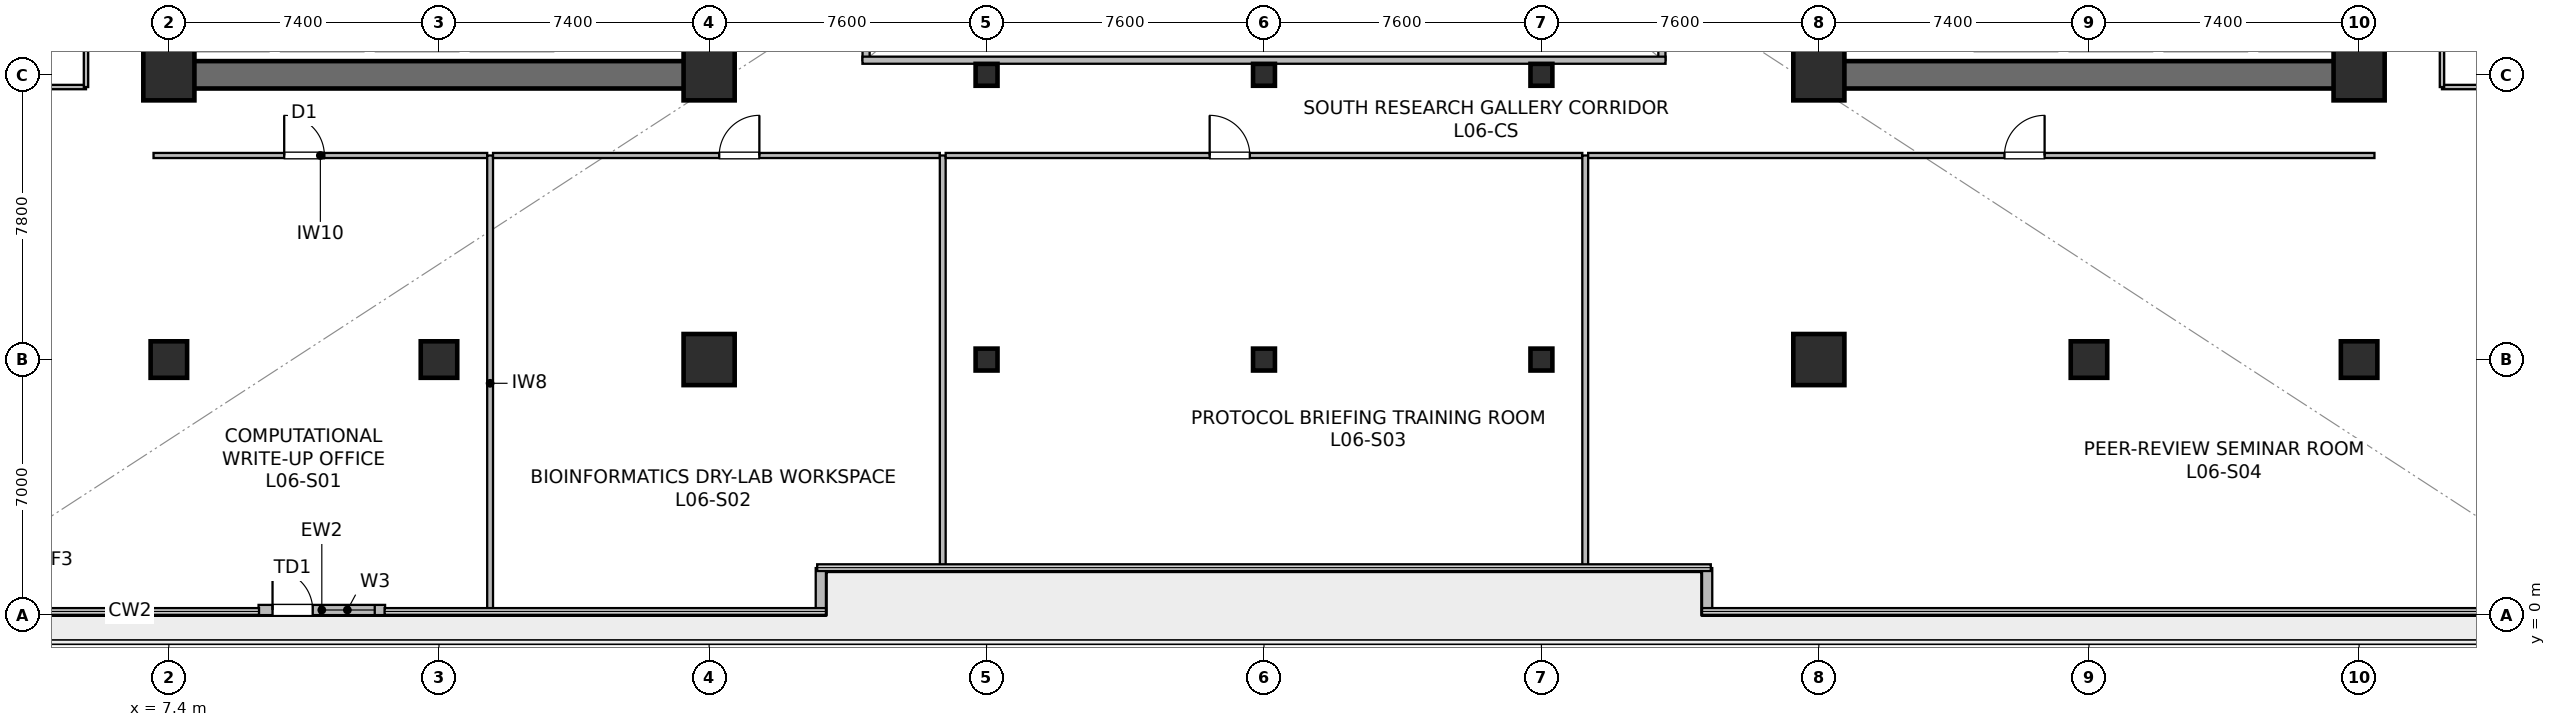
"""IFC4 building model, lengths in metres.
Left out: names, types, materials, properties, quantities, classifications, styles, units other than length and angle.
Written with IfcOpenShell. Run it as: python <this file> out.ifc"""

import sys

from ifc_helpers import new_model, si_unit, direction, frame, frame_2d, origin, origin_2d, place, context, subcontext, project, spatial, rectangle, hollow_rectangle, extrude, source, transform, mapped, element, fill, save


model = new_model("IFC4")
c1 = context("Model", 3, precision=1e-05, world=origin(), true_north=direction((0.0, 1.0)))
c2 = subcontext(c1, "Body", "Model", "MODEL_VIEW")
j1 = project(units=[si_unit("LENGTHUNIT", "METRE"), si_unit("PLANEANGLEUNIT", "RADIAN")], contexts=[c1])
p1 = place(None, origin())
s1 = spatial("IfcSite", under=j1, at=p1, CompositionType="ELEMENT")
p2 = place(p1, origin())
s2 = spatial("IfcBuilding", under=s1, at=p2, CompositionType="ELEMENT")
p3 = place(p2, frame((0.0, 0.0, 25.2)))
s3 = spatial("IfcBuildingStorey", under=s2, at=p3, CompositionType="ELEMENT", Elevation=25.2)
p4 = place(p3, frame((7.025, 14.8, 0.0), z_axis=(0.0, 0.0, 1.0), x_axis=(1.0, 0.0, 0.0)))
e1 = element("IfcWall", 1, at=p4, inside=s3, PredefinedType="SHEAR", context=c2, shape_type="SweptSolid", body=[
    extrude(rectangle(XDim=15.55, YDim=0.75, at=frame_2d((7.775, 0.0))), origin(), (0.0, 0.0, 1.0), 3.78),
])
p5 = place(p3, frame((7.4, 15.175, 0.0), z_axis=(0.0, 0.0, 1.0), x_axis=(0.0, 1.0, 0.0)))
e2 = element("IfcWall", 2, at=p5, inside=s3, PredefinedType="SHEAR", context=c2, shape_type="SweptSolid", body=[
    extrude(rectangle(XDim=18.25, YDim=0.75, at=frame_2d((9.125, 0.0))), origin(), (0.0, 0.0, 1.0), 3.78),
])
p6 = place(p3, frame((22.2, 15.175, 0.0), z_axis=(0.0, 0.0, 1.0), x_axis=(0.0, 1.0, 0.0)))
e3 = element("IfcWall", 3, at=p6, inside=s3, PredefinedType="SHEAR", context=c2, shape_type="SweptSolid", body=[
    extrude(rectangle(XDim=18.25, YDim=0.75, at=frame_2d((9.125, 0.0))), origin(), (0.0, 0.0, 1.0), 3.78),
])
p7 = place(p6, frame((3.375, 0.0, 0.0)))
e4 = element("IfcOpeningElement", 4, at=p7, cuts=e3, PredefinedType="OPENING", context=c2, shape_type="SweptSolid", body=[
    extrude(rectangle(XDim=1.42, YDim=2.2, at=frame_2d((0.71, 1.1))), frame((0.0, 0.385, 0.0), z_axis=(0.0, -1.0, 0.0), x_axis=(1.0, 0.0, 0.0)), (0.0, 0.0, 1.0), 0.77),
])
p8 = place(p3, frame((52.225, 14.8, 0.0), z_axis=(0.0, 0.0, 1.0), x_axis=(1.0, 0.0, 0.0)))
e5 = element("IfcWall", 5, at=p8, inside=s3, PredefinedType="SHEAR", context=c2, shape_type="SweptSolid", body=[
    extrude(rectangle(XDim=15.55, YDim=0.75, at=frame_2d((7.775, 0.0))), origin(), (0.0, 0.0, 1.0), 3.78),
])
p9 = place(p3, frame((52.6, 15.175, 0.0), z_axis=(0.0, 0.0, 1.0), x_axis=(0.0, 1.0, 0.0)))
e6 = element("IfcWall", 6, at=p9, inside=s3, PredefinedType="SHEAR", context=c2, shape_type="SweptSolid", body=[
    extrude(rectangle(XDim=18.25, YDim=0.75, at=frame_2d((9.125, 0.0))), origin(), (0.0, 0.0, 1.0), 3.78),
])
p10 = place(p9, frame((3.375, 0.0, 0.0)))
e7 = element("IfcOpeningElement", 7, at=p10, cuts=e6, PredefinedType="OPENING", context=c2, shape_type="SweptSolid", body=[
    extrude(rectangle(XDim=1.42, YDim=2.2, at=frame_2d((0.71, 1.1))), frame((0.0, 0.385, 0.0), z_axis=(0.0, -1.0, 0.0), x_axis=(1.0, 0.0, 0.0)), (0.0, 0.0, 1.0), 0.77),
])
p11 = place(p3, frame((67.4, 15.175, 0.0), z_axis=(0.0, 0.0, 1.0), x_axis=(0.0, 1.0, 0.0)))
e8 = element("IfcWall", 8, at=p11, inside=s3, PredefinedType="SHEAR", context=c2, shape_type="SweptSolid", body=[
    extrude(rectangle(XDim=18.25, YDim=0.75, at=frame_2d((9.125, 0.0))), origin(), (0.0, 0.0, 1.0), 3.78),
])
m1 = source(origin(), c2, "Body", "SweptSolid", [
    extrude(rectangle(XDim=1.0, YDim=1.0, at=origin_2d()), origin(), (0.0, 0.0, 1.0), 4.1),
])
p12 = place(p3, frame((14.8, 7.0, 0.0), z_axis=(0.0, 0.0, 1.0), x_axis=(1.0, 0.0, 0.0)))
e9 = element("IfcColumn", 9, at=p12, inside=s3, PredefinedType="COLUMN", context=c2, shape_type="MappedRepresentation", body=[
    mapped(m1, transform((0.0, 0.0, 0.0), scale=1.0)),
])
m2 = source(origin(), c2, "Body", "SweptSolid", [
    extrude(rectangle(XDim=1.4, YDim=1.4, at=origin_2d()), origin(), (0.0, 0.0, 1.0), 4.1),
])
for number, where, z_axis, x_axis in (
    (10, (22.2, 7.0, 0.0), (0.0, 0.0, 1.0), (1.0, 0.0, 0.0)),
    (11, (7.4, 14.8, 0.0), (0.0, 0.0, 1.0), (1.0, 0.0, 0.0)),
    (12, (22.2, 14.8, 0.0), (0.0, 0.0, 1.0), (1.0, 0.0, 0.0)),
    (13, (52.6, 7.0, 0.0), (0.0, 0.0, 1.0), (1.0, 0.0, 0.0)),
):
    element("IfcColumn", number, at=place(p3, frame(where, z_axis=z_axis, x_axis=x_axis)), inside=s3, PredefinedType="COLUMN", context=c2, shape_type="MappedRepresentation", body=[
        mapped(m2, transform((0.0, 0.0, 0.0), scale=1.0)),
    ])
p13 = place(p3, frame((60.0, 7.0, 0.0), z_axis=(0.0, 0.0, 1.0), x_axis=(1.0, 0.0, 0.0)))
e14 = element("IfcColumn", 14, at=p13, inside=s3, PredefinedType="COLUMN", context=c2, shape_type="MappedRepresentation", body=[
    mapped(m1, transform((0.0, 0.0, 0.0), scale=1.0)),
])
for number, where, z_axis, x_axis in (
    (15, (52.6, 14.8, 0.0), (0.0, 0.0, 1.0), (1.0, 0.0, 0.0)),
    (16, (67.4, 14.8, 0.0), (0.0, 0.0, 1.0), (1.0, 0.0, 0.0)),
):
    element("IfcColumn", number, at=place(p3, frame(where, z_axis=z_axis, x_axis=x_axis)), inside=s3, PredefinedType="COLUMN", context=c2, shape_type="MappedRepresentation", body=[
        mapped(m2, transform((0.0, 0.0, 0.0), scale=1.0)),
    ])
for number, where, z_axis, x_axis in (
    (17, (7.4, 7.0, 0.0), (0.0, 0.0, 1.0), (1.0, 0.0, 0.0)),
    (18, (67.4, 7.0, 0.0), (0.0, 0.0, 1.0), (1.0, 0.0, 0.0)),
):
    element("IfcColumn", number, at=place(p3, frame(where, z_axis=z_axis, x_axis=x_axis)), inside=s3, PredefinedType="COLUMN", context=c2, shape_type="MappedRepresentation", body=[
        mapped(m1, transform((0.0, 0.0, 0.0), scale=1.0)),
    ])
m3 = source(origin(), c2, "Body", "SweptSolid", [
    extrude(hollow_rectangle(XDim=0.6, YDim=0.6, WallThickness=0.028, at=origin_2d()), origin(), (0.0, 0.0, 1.0), 4.1),
])
for number, where, z_axis, x_axis in (
    (19, (29.8, 7.0, 0.0), (0.0, 0.0, 1.0), (1.0, 0.0, 0.0)),
    (20, (29.8, 14.8, 0.0), (0.0, 0.0, 1.0), (1.0, 0.0, 0.0)),
    (21, (37.4, 7.0, 0.0), (0.0, 0.0, 1.0), (1.0, 0.0, 0.0)),
    (22, (37.4, 14.8, 0.0), (0.0, 0.0, 1.0), (1.0, 0.0, 0.0)),
    (23, (45.0, 7.0, 0.0), (0.0, 0.0, 1.0), (1.0, 0.0, 0.0)),
    (24, (45.0, 14.8, 0.0), (0.0, 0.0, 1.0), (1.0, 0.0, 0.0)),
):
    element("IfcColumn", number, at=place(p3, frame(where, z_axis=z_axis, x_axis=x_axis)), inside=s3, PredefinedType="COLUMN", context=c2, shape_type="MappedRepresentation", body=[
        mapped(m3, transform((0.0, 0.0, 0.0), scale=1.0)),
    ])
p14 = place(p3, frame((9.857, 0.14, 0.0), z_axis=(0.0, 0.0, 1.0), x_axis=(1.0, 0.0, 0.0)))
e25 = element("IfcWall", 25, at=p14, inside=s3, PredefinedType="STANDARD", context=c2, shape_type="SweptSolid", body=[
    extrude(rectangle(XDim=3.466, YDim=0.28, at=frame_2d((1.733, 0.0))), origin(), (0.0, 0.0, 1.0), 3.78),
])
p15 = place(p14, frame((0.383, 0.0, 0.0)))
e26 = element("IfcOpeningElement", 26, at=p15, cuts=e25, PredefinedType="OPENING", context=c2, shape_type="SweptSolid", body=[
    extrude(rectangle(XDim=1.1, YDim=2.2, at=frame_2d((0.55, 1.1))), frame((0.0, 0.15, 0.0), z_axis=(0.0, -1.0, 0.0), x_axis=(1.0, 0.0, 0.0)), (0.0, 0.0, 1.0), 0.3),
])
p16 = place(p14, frame((1.683, 0.0, 0.9)))
e27 = element("IfcOpeningElement", 27, at=p16, cuts=e25, PredefinedType="OPENING", context=c2, shape_type="SweptSolid", body=[
    extrude(rectangle(XDim=1.5, YDim=2.2, at=frame_2d((0.75, 1.1))), frame((0.0, 0.15, 0.0), z_axis=(0.0, -1.0, 0.0), x_axis=(1.0, 0.0, 0.0)), (0.0, 0.0, 1.0), 0.3),
])
for number, where, z_axis, x_axis in (
    (28, (25.26, 0.0, 0.0), (0.0, 0.0, 1.0), (0.0, 1.0, 0.0)),
    (29, (49.54, 1.288, 0.0), (0.0, 0.0, 1.0), (0.0, -1.0, 0.0)),
):
    element("IfcWall", number, at=place(p3, frame(where, z_axis=z_axis, x_axis=x_axis)), inside=s3, PredefinedType="STANDARD", context=c2, shape_type="SweptSolid", body=[
        extrude(rectangle(XDim=1.288, YDim=0.28, at=frame_2d((0.644, 0.0))), origin(), (0.0, 0.0, 1.0), 3.78),
    ])
p17 = place(p3, frame((26.5, 15.2, 0.0), z_axis=(0.0, 0.0, 1.0), x_axis=(0.0, 1.0, 0.0)))
e30 = element("IfcWall", 30, at=p17, inside=s3, PredefinedType="SOLIDWALL", context=c2, shape_type="SweptSolid", body=[
    extrude(rectangle(XDim=18.2, YDim=0.195, at=frame_2d((9.1, 0.0))), origin(), (0.0, 0.0, 1.0), 3.78),
])
p18 = place(p17, frame((1.8, 0.0, 0.9)))
e31 = element("IfcOpeningElement", 31, at=p18, cuts=e30, PredefinedType="OPENING", context=c2, shape_type="SweptSolid", body=[
    extrude(rectangle(XDim=1.5, YDim=1.4, at=frame_2d((0.75, 0.7))), frame((0.0, 0.107, 0.0), z_axis=(0.0, -1.0, 0.0), x_axis=(1.0, 0.0, 0.0)), (0.0, 0.0, 1.0), 0.215),
])
p19 = place(p17, frame((13.2, 0.0, 0.9)))
e32 = element("IfcOpeningElement", 32, at=p19, cuts=e30, PredefinedType="OPENING", context=c2, shape_type="SweptSolid", body=[
    extrude(rectangle(XDim=1.5, YDim=1.4, at=frame_2d((0.75, 0.7))), frame((0.0, 0.107, 0.0), z_axis=(0.0, -1.0, 0.0), x_axis=(1.0, 0.0, 0.0)), (0.0, 0.0, 1.0), 0.215),
])
p20 = place(p3, frame((48.3, 15.2, 0.0), z_axis=(0.0, 0.0, 1.0), x_axis=(0.0, 1.0, 0.0)))
e33 = element("IfcWall", 33, at=p20, inside=s3, PredefinedType="SOLIDWALL", context=c2, shape_type="SweptSolid", body=[
    extrude(rectangle(XDim=18.2, YDim=0.195, at=frame_2d((9.1, 0.0))), origin(), (0.0, 0.0, 1.0), 3.78),
])
p21 = place(p20, frame((1.8, 0.0, 0.9)))
e34 = element("IfcOpeningElement", 34, at=p21, cuts=e33, PredefinedType="OPENING", context=c2, shape_type="SweptSolid", body=[
    extrude(rectangle(XDim=1.5, YDim=1.4, at=frame_2d((0.75, 0.7))), frame((0.0, 0.107, 0.0), z_axis=(0.0, -1.0, 0.0), x_axis=(1.0, 0.0, 0.0)), (0.0, 0.0, 1.0), 0.215),
])
p22 = place(p20, frame((13.2, 0.0, 0.9)))
e35 = element("IfcOpeningElement", 35, at=p22, cuts=e33, PredefinedType="OPENING", context=c2, shape_type="SweptSolid", body=[
    extrude(rectangle(XDim=1.5, YDim=1.4, at=frame_2d((0.75, 0.7))), frame((0.0, 0.107, 0.0), z_axis=(0.0, -1.0, 0.0), x_axis=(1.0, 0.0, 0.0)), (0.0, 0.0, 1.0), 0.215),
])
p23 = place(p3, frame((26.4, 15.2, 0.0), z_axis=(0.0, 0.0, 1.0), x_axis=(1.0, 0.0, 0.0)))
e36 = element("IfcWall", 36, at=p23, inside=s3, PredefinedType="SOLIDWALL", context=c2, shape_type="SweptSolid", body=[
    extrude(rectangle(XDim=22.0, YDim=0.195, at=frame_2d((11.0, 0.0))), origin(), (0.0, 0.0, 1.0), 3.78),
])
p24 = place(p3, frame((6.98, 12.59, 0.0), z_axis=(0.0, 0.0, 1.0), x_axis=(1.0, 0.0, 0.0)))
e37 = element("IfcWall", 37, at=p24, inside=s3, PredefinedType="PARTITIONING", context=c2, shape_type="SweptSolid", body=[
    extrude(rectangle(XDim=9.14, YDim=0.14, at=frame_2d((4.57, 0.0))), origin(), (0.0, 0.0, 1.0), 3.065),
])
p25 = place(p24, frame((3.58, 0.0, 0.0)))
e38 = element("IfcOpeningElement", 38, at=p25, cuts=e37, PredefinedType="OPENING", context=c2, shape_type="SweptSolid", body=[
    extrude(rectangle(XDim=1.1, YDim=2.18, at=frame_2d((0.55, 1.09))), frame((0.0, 0.08, 0.0), z_axis=(0.0, -1.0, 0.0), x_axis=(1.0, 0.0, 0.0)), (0.0, 0.0, 1.0), 0.16),
])
p26 = place(p3, frame((16.2, 0.11, 0.0), z_axis=(0.0, 0.0, 1.0), x_axis=(0.0, 1.0, 0.0)))
e39 = element("IfcWall", 39, at=p26, inside=s3, PredefinedType="PARTITIONING", context=c2, shape_type="SweptSolid", body=[
    extrude(rectangle(XDim=12.48, YDim=0.16, at=frame_2d((6.24, 0.0))), origin(), (0.0, 0.0, 1.0), 3.015),
])
p27 = place(p3, frame((16.28, 12.59, 0.0), z_axis=(0.0, 0.0, 1.0), x_axis=(1.0, 0.0, 0.0)))
e40 = element("IfcWall", 40, at=p27, inside=s3, PredefinedType="PARTITIONING", context=c2, shape_type="SweptSolid", body=[
    extrude(rectangle(XDim=12.24, YDim=0.14, at=frame_2d((6.12, 0.0))), origin(), (0.0, 0.0, 1.0), 3.065),
])
p28 = place(p27, frame((6.196, 0.0, 0.0)))
e41 = element("IfcOpeningElement", 41, at=p28, cuts=e40, PredefinedType="OPENING", context=c2, shape_type="SweptSolid", body=[
    extrude(rectangle(XDim=1.1, YDim=2.18, at=frame_2d((0.55, 1.09))), frame((0.0, 0.08, 0.0), z_axis=(0.0, -1.0, 0.0), x_axis=(1.0, 0.0, 0.0)), (0.0, 0.0, 1.0), 0.16),
])
p29 = place(p3, frame((28.6, 1.31, 0.0), z_axis=(0.0, 0.0, 1.0), x_axis=(0.0, 1.0, 0.0)))
e42 = element("IfcWall", 42, at=p29, inside=s3, PredefinedType="PARTITIONING", context=c2, shape_type="SweptSolid", body=[
    extrude(rectangle(XDim=11.28, YDim=0.16, at=frame_2d((5.64, 0.0))), origin(), (0.0, 0.0, 1.0), 3.015),
])
p30 = place(p3, frame((28.68, 12.59, 0.0), z_axis=(0.0, 0.0, 1.0), x_axis=(1.0, 0.0, 0.0)))
e43 = element("IfcWall", 43, at=p30, inside=s3, PredefinedType="PARTITIONING", context=c2, shape_type="SweptSolid", body=[
    extrude(rectangle(XDim=17.44, YDim=0.14, at=frame_2d((8.72, 0.0))), origin(), (0.0, 0.0, 1.0), 3.065),
])
p31 = place(p30, frame((7.232, 0.0, 0.0)))
e44 = element("IfcOpeningElement", 44, at=p31, cuts=e43, PredefinedType="OPENING", context=c2, shape_type="SweptSolid", body=[
    extrude(rectangle(XDim=1.1, YDim=2.18, at=frame_2d((0.55, 1.09))), frame((0.0, 0.08, 0.0), z_axis=(0.0, -1.0, 0.0), x_axis=(1.0, 0.0, 0.0)), (0.0, 0.0, 1.0), 0.16),
])
p32 = place(p3, frame((46.2, 1.31, 0.0), z_axis=(0.0, 0.0, 1.0), x_axis=(0.0, 1.0, 0.0)))
e45 = element("IfcWall", 45, at=p32, inside=s3, PredefinedType="PARTITIONING", context=c2, shape_type="SweptSolid", body=[
    extrude(rectangle(XDim=11.28, YDim=0.16, at=frame_2d((5.64, 0.0))), origin(), (0.0, 0.0, 1.0), 3.015),
])
p33 = place(p3, frame((46.28, 12.59, 0.0), z_axis=(0.0, 0.0, 1.0), x_axis=(1.0, 0.0, 0.0)))
e46 = element("IfcWall", 46, at=p33, inside=s3, PredefinedType="PARTITIONING", context=c2, shape_type="SweptSolid", body=[
    extrude(rectangle(XDim=21.54, YDim=0.14, at=frame_2d((10.77, 0.0))), origin(), (0.0, 0.0, 1.0), 3.065),
])
p34 = place(p33, frame((11.404, 0.0, 0.0)))
e47 = element("IfcOpeningElement", 47, at=p34, cuts=e46, PredefinedType="OPENING", context=c2, shape_type="SweptSolid", body=[
    extrude(rectangle(XDim=1.1, YDim=2.18, at=frame_2d((0.55, 1.09))), frame((0.0, 0.08, 0.0), z_axis=(0.0, -1.0, 0.0), x_axis=(1.0, 0.0, 0.0)), (0.0, 0.0, 1.0), 0.16),
])
p35 = place(p3, frame((0.11, 14.465, 0.0), z_axis=(0.0, 0.0, 1.0), x_axis=(1.0, 0.0, 0.0)))
e48 = element("IfcWall", 48, at=p35, inside=s3, PredefinedType="PARTITIONING", context=c2, shape_type="SweptSolid", body=[
    extrude(rectangle(XDim=5.02, YDim=0.12, at=frame_2d((2.51, 0.0))), origin(), (0.0, 0.0, 1.0), 3.78),
])
p36 = place(p3, frame((5.13, 14.465, 0.0), z_axis=(0.0, 0.0, 1.0), x_axis=(0.0, 1.0, 0.0)))
e49 = element("IfcWall", 49, at=p36, inside=s3, PredefinedType="PARTITIONING", context=c2, shape_type="SweptSolid", body=[
    extrude(rectangle(XDim=7.875, YDim=0.12, at=frame_2d((3.938, 0.0))), origin(), (0.0, 0.0, 1.0), 3.78),
])
p37 = place(p36, frame((3.488, 0.0, 0.0)))
e50 = element("IfcOpeningElement", 50, at=p37, cuts=e49, PredefinedType="OPENING", context=c2, shape_type="SweptSolid", body=[
    extrude(rectangle(XDim=0.9, YDim=2.1, at=frame_2d((0.45, 1.05))), frame((0.0, 0.07, 0.0), z_axis=(0.0, -1.0, 0.0), x_axis=(1.0, 0.0, 0.0)), (0.0, 0.0, 1.0), 0.14),
])
p38 = place(p3, frame((69.67, 14.465, 0.0), z_axis=(0.0, 0.0, 1.0), x_axis=(1.0, 0.0, 0.0)))
e51 = element("IfcWall", 51, at=p38, inside=s3, PredefinedType="PARTITIONING", context=c2, shape_type="SweptSolid", body=[
    extrude(rectangle(XDim=5.02, YDim=0.12, at=frame_2d((2.51, 0.0))), origin(), (0.0, 0.0, 1.0), 3.78),
])
p39 = place(p3, frame((69.67, 14.465, 0.0), z_axis=(0.0, 0.0, 1.0), x_axis=(0.0, 1.0, 0.0)))
e52 = element("IfcWall", 52, at=p39, inside=s3, PredefinedType="PARTITIONING", context=c2, shape_type="SweptSolid", body=[
    extrude(rectangle(XDim=11.275, YDim=0.12, at=frame_2d((5.637, 0.0))), origin(), (0.0, 0.0, 1.0), 3.78),
])
p40 = place(p39, frame((5.188, 0.0, 0.0)))
e53 = element("IfcOpeningElement", 53, at=p40, cuts=e52, PredefinedType="OPENING", context=c2, shape_type="SweptSolid", body=[
    extrude(rectangle(XDim=0.9, YDim=2.1, at=frame_2d((0.45, 1.05))), frame((0.0, 0.07, 0.0), z_axis=(0.0, -1.0, 0.0), x_axis=(1.0, 0.0, 0.0)), (0.0, 0.0, 1.0), 0.14),
])
m4 = source(origin(), c2, "Body", "SweptSolid", [
    extrude(rectangle(XDim=1.1, YDim=2.2, at=frame_2d((0.55, 1.1))), frame((0.0, 0.025, 0.0), z_axis=(0.0, -1.0, 0.0), x_axis=(1.0, 0.0, 0.0)), (0.0, 0.0, 1.0), 0.05),
])
p41 = place(p15, origin())
e54 = element("IfcDoor", 54, at=p41, inside=s3, OperationType="SINGLE_SWING_LEFT", PredefinedType="DOOR", context=c2, shape_type="MappedRepresentation", body=[
    mapped(m4, transform((0.0, 0.0, 0.0), scale=1.0)),
])
fill(e26, e54)
m5 = source(origin(), c2, "Body", "SweptSolid", [
    extrude(rectangle(XDim=1.5, YDim=2.2, at=frame_2d((0.75, 1.1))), frame((0.0, 0.03, 0.0), z_axis=(0.0, -1.0, 0.0), x_axis=(1.0, 0.0, 0.0)), (0.0, 0.0, 1.0), 0.06),
])
p42 = place(p16, origin())
e55 = element("IfcWindow", 55, at=p42, inside=s3, PartitioningType="SINGLE_PANEL", PredefinedType="WINDOW", context=c2, shape_type="MappedRepresentation", body=[
    mapped(m5, transform((0.0, 0.0, 0.0), scale=1.0)),
])
fill(e27, e55)
m6 = source(origin(), c2, "Body", "SweptSolid", [
    extrude(rectangle(XDim=1.1, YDim=2.18, at=frame_2d((0.55, 1.09))), frame((0.0, 0.025, 0.0), z_axis=(0.0, -1.0, 0.0), x_axis=(1.0, 0.0, 0.0)), (0.0, 0.0, 1.0), 0.05),
])
p43 = place(p25, origin())
e56 = element("IfcDoor", 56, at=p43, inside=s3, OperationType="SINGLE_SWING_LEFT", PredefinedType="DOOR", context=c2, shape_type="MappedRepresentation", body=[
    mapped(m6, transform((0.0, 0.0, 0.0), scale=1.0)),
])
fill(e38, e56)
p44 = place(p28, origin())
e57 = element("IfcDoor", 57, at=p44, inside=s3, OperationType="SINGLE_SWING_RIGHT", PredefinedType="DOOR", context=c2, shape_type="MappedRepresentation", body=[
    mapped(m6, transform((0.0, 0.0, 0.0), scale=1.0)),
])
fill(e41, e57)
p45 = place(p31, origin())
e58 = element("IfcDoor", 58, at=p45, inside=s3, OperationType="SINGLE_SWING_LEFT", PredefinedType="DOOR", context=c2, shape_type="MappedRepresentation", body=[
    mapped(m6, transform((0.0, 0.0, 0.0), scale=1.0)),
])
fill(e44, e58)
p46 = place(p34, origin())
e59 = element("IfcDoor", 59, at=p46, inside=s3, OperationType="SINGLE_SWING_RIGHT", PredefinedType="DOOR", context=c2, shape_type="MappedRepresentation", body=[
    mapped(m6, transform((0.0, 0.0, 0.0), scale=1.0)),
])
fill(e47, e59)
save(model, sys.argv[1])
